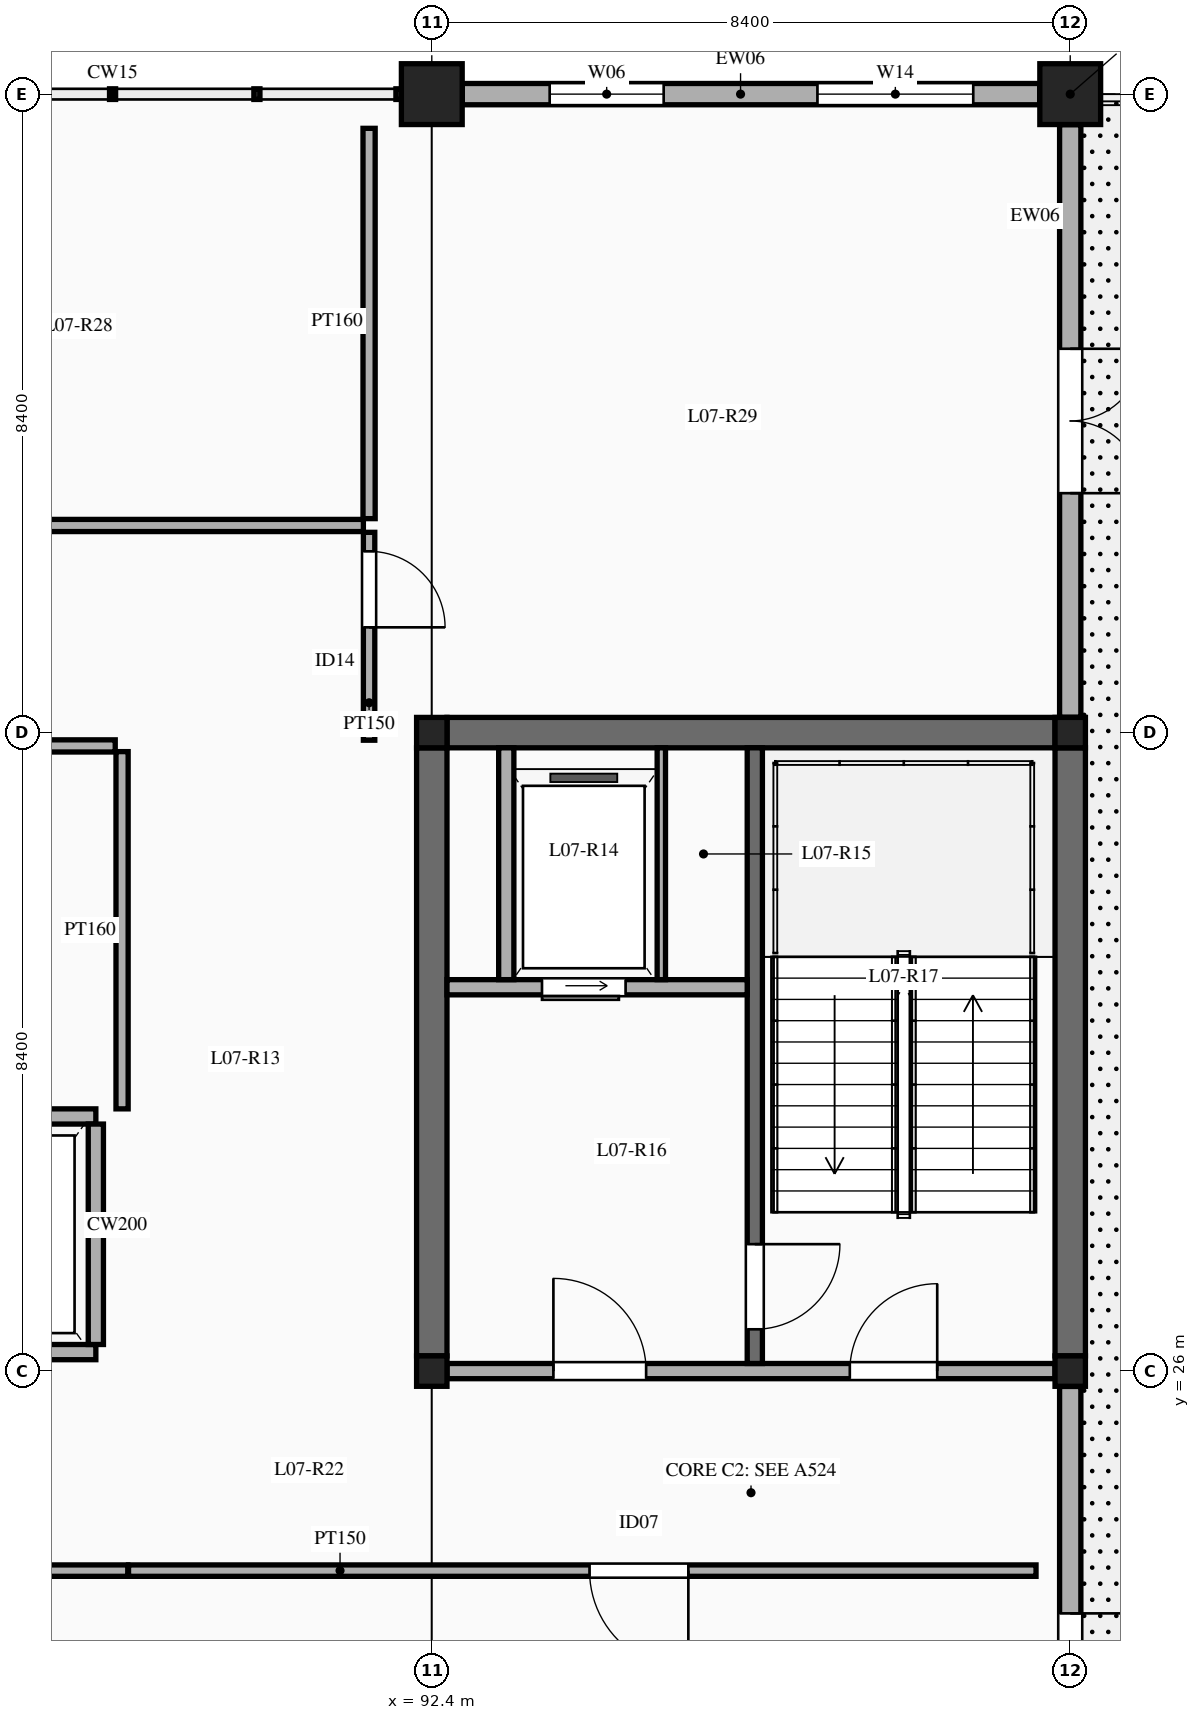
"""IFC4 building model, lengths in metres.
Left out: names, types, materials, properties, quantities, classifications, styles, units other than length and angle.
Written with IfcOpenShell. Run it as: python <this file> out.ifc"""

import sys

from ifc_helpers import new_model, si_unit, direction, frame, frame_2d, origin, origin_2d, place, context, subcontext, project, spatial, rectangle, extrude, element, fill, save


model = new_model("IFC4")
c1 = context("Model", 3, precision=1e-05, world=origin(), true_north=direction((0.0, 1.0)))
c2 = subcontext(c1, "Body", "Model", "MODEL_VIEW")
j1 = project(units=[si_unit("LENGTHUNIT", "METRE"), si_unit("PLANEANGLEUNIT", "RADIAN")], contexts=[c1])
p1 = place(None, origin())
s1 = spatial("IfcSite", under=j1, at=p1, CompositionType="ELEMENT")
p2 = place(p1, origin())
s2 = spatial("IfcBuilding", under=s1, at=p2, CompositionType="ELEMENT")
p3 = place(p2, frame((0.0, 0.0, 33.0)))
s3 = spatial("IfcBuildingStorey", under=s2, at=p3, CompositionType="ELEMENT", Elevation=33.0)
for number, where, z_axis, x_axis in (
    (1, (92.4, 26.0, 0.0), (0.0, 0.0, 1.0), (1.0, 0.0, 0.0)),
    (2, (92.4, 34.4, 0.0), (0.0, 0.0, 1.0), (1.0, 0.0, 0.0)),
):
    element("IfcColumn", number, at=place(p3, frame(where, z_axis=z_axis, x_axis=x_axis)), inside=s3, PredefinedType="COLUMN", context=c2, shape_type="SweptSolid", body=[
        extrude(rectangle(XDim=0.4, YDim=0.4, at=origin_2d()), origin(), (0.0, 0.0, 1.0), 4.5),
    ])
p4 = place(p3, frame((92.4, 42.8, 0.0), z_axis=(0.0, 0.0, 1.0), x_axis=(1.0, 0.0, 0.0)))
e3 = element("IfcColumn", 3, at=p4, inside=s3, PredefinedType="COLUMN", context=c2, shape_type="SweptSolid", body=[
    extrude(rectangle(XDim=0.8, YDim=0.8, at=origin_2d()), origin(), (0.0, 0.0, 1.0), 4.5),
])
for number, where, z_axis, x_axis in (
    (4, (100.8, 26.0, 0.0), (0.0, 0.0, 1.0), (1.0, 0.0, 0.0)),
    (5, (100.8, 34.4, 0.0), (0.0, 0.0, 1.0), (1.0, 0.0, 0.0)),
):
    element("IfcColumn", number, at=place(p3, frame(where, z_axis=z_axis, x_axis=x_axis)), inside=s3, PredefinedType="COLUMN", context=c2, shape_type="SweptSolid", body=[
        extrude(rectangle(XDim=0.4, YDim=0.4, at=origin_2d()), origin(), (0.0, 0.0, 1.0), 4.5),
    ])
p5 = place(p3, frame((100.8, 42.8, 0.0), z_axis=(0.0, 0.0, 1.0), x_axis=(1.0, 0.0, 0.0)))
e6 = element("IfcColumn", 6, at=p5, inside=s3, PredefinedType="COLUMN", context=c2, shape_type="SweptSolid", body=[
    extrude(rectangle(XDim=0.8, YDim=0.8, at=origin_2d()), origin(), (0.0, 0.0, 1.0), 4.5),
])
for number, where, z_axis, x_axis in (
    (7, (92.4, 26.2, 0.0), (0.0, 0.0, 1.0), (0.0, 1.0, 0.0)),
    (8, (100.8, 26.2, 0.0), (0.0, 0.0, 1.0), (0.0, 1.0, 0.0)),
    (9, (92.6, 34.4, 0.0), (0.0, 0.0, 1.0), (1.0, 0.0, 0.0)),
):
    element("IfcWall", number, at=place(p3, frame(where, z_axis=z_axis, x_axis=x_axis)), inside=s3, PredefinedType="SHEAR", context=c2, shape_type="SweptSolid", body=[
        extrude(rectangle(XDim=8.0, YDim=0.4, at=frame_2d((4.0, 0.0))), origin(), (0.0, 0.0, 1.0), 4.5),
    ])
p6 = place(p3, frame((92.802, 42.8, 0.0), z_axis=(0.0, 0.0, 1.0), x_axis=(1.0, 0.0, 0.0)))
e10 = element("IfcWall", 10, at=p6, inside=s3, PredefinedType="ELEMENTEDWALL", context=c2, shape_type="SweptSolid", body=[
    extrude(rectangle(XDim=7.596, YDim=0.28, at=frame_2d((3.798, 0.0))), origin(), (0.0, 0.0, 1.0), 3.55),
])
p7 = place(p6, frame((1.149, 0.0, 0.9)))
e11 = element("IfcOpeningElement", 11, at=p7, cuts=e10, PredefinedType="OPENING", context=c2, shape_type="SweptSolid", body=[
    extrude(rectangle(XDim=1.5, YDim=2.0, at=frame_2d((0.75, 1.0))), frame((0.0, 0.15, 0.0), z_axis=(0.0, -1.0, 0.0), x_axis=(1.0, 0.0, 0.0)), (0.0, 0.0, 1.0), 0.3),
])
p8 = place(p6, frame((4.672, 0.0, 0.9)))
e12 = element("IfcOpeningElement", 12, at=p8, cuts=e10, PredefinedType="OPENING", context=c2, shape_type="SweptSolid", body=[
    extrude(rectangle(XDim=2.05, YDim=2.1, at=frame_2d((1.025, 1.05))), frame((0.0, 0.15, 0.0), z_axis=(0.0, -1.0, 0.0), x_axis=(1.0, 0.0, 0.0)), (0.0, 0.0, 1.0), 0.3),
])
p9 = place(p3, frame((100.8, 18.027, 0.0), z_axis=(0.0, 0.0, 1.0), x_axis=(0.0, 1.0, 0.0)))
e13 = element("IfcWall", 13, at=p9, inside=s3, PredefinedType="ELEMENTEDWALL", context=c2, shape_type="SweptSolid", body=[
    extrude(rectangle(XDim=7.771, YDim=0.28, at=frame_2d((3.885, 0.0))), origin(), (0.0, 0.0, 1.0), 3.55),
])
p10 = place(p9, frame((2.986, 0.0, 0.0)))
e14 = element("IfcOpeningElement", 14, at=p10, cuts=e13, PredefinedType="OPENING", context=c2, shape_type="SweptSolid", body=[
    extrude(rectangle(XDim=1.8, YDim=2.2, at=frame_2d((0.9, 1.1))), frame((0.0, 0.15, 0.0), z_axis=(0.0, -1.0, 0.0), x_axis=(1.0, 0.0, 0.0)), (0.0, 0.0, 1.0), 0.3),
])
p11 = place(p3, frame((100.8, 34.602, 0.0), z_axis=(0.0, 0.0, 1.0), x_axis=(0.0, 1.0, 0.0)))
e15 = element("IfcWall", 15, at=p11, inside=s3, PredefinedType="ELEMENTEDWALL", context=c2, shape_type="SweptSolid", body=[
    extrude(rectangle(XDim=7.796, YDim=0.28, at=frame_2d((3.898, 0.0))), origin(), (0.0, 0.0, 1.0), 3.55),
])
p12 = place(p11, frame((2.948, 0.0, 0.0)))
e16 = element("IfcOpeningElement", 16, at=p12, cuts=e15, PredefinedType="OPENING", context=c2, shape_type="SweptSolid", body=[
    extrude(rectangle(XDim=1.9, YDim=2.2, at=frame_2d((0.95, 1.1))), frame((0.0, 0.15, 0.0), z_axis=(0.0, -1.0, 0.0), x_axis=(1.0, 0.0, 0.0)), (0.0, 0.0, 1.0), 0.3),
])
p13 = place(p3, frame((92.6, 26.0, 0.0), z_axis=(0.0, 0.0, 1.0), x_axis=(1.0, 0.0, 0.0)))
e17 = element("IfcWall", 17, at=p13, inside=s3, PredefinedType="SOLIDWALL", context=c2, shape_type="SweptSolid", body=[
    extrude(rectangle(XDim=8.0, YDim=0.2, at=frame_2d((4.0, 0.0))), origin(), (0.0, 0.0, 1.0), 3.73),
])
p14 = place(p13, frame((1.4, 0.0, 0.0)))
e18 = element("IfcOpeningElement", 18, at=p14, cuts=e17, PredefinedType="OPENING", context=c2, shape_type="SweptSolid", body=[
    extrude(rectangle(XDim=1.22, YDim=2.15, at=frame_2d((0.61, 1.075))), frame((0.0, 0.11, 0.0), z_axis=(0.0, -1.0, 0.0), x_axis=(1.0, 0.0, 0.0)), (0.0, 0.0, 1.0), 0.22),
])
p15 = place(p13, frame((5.3, 0.0, 0.0)))
e19 = element("IfcOpeningElement", 19, at=p15, cuts=e17, PredefinedType="OPENING", context=c2, shape_type="SweptSolid", body=[
    extrude(rectangle(XDim=1.15, YDim=2.15, at=frame_2d((0.575, 1.075))), frame((0.0, 0.11, 0.0), z_axis=(0.0, -1.0, 0.0), x_axis=(1.0, 0.0, 0.0)), (0.0, 0.0, 1.0), 0.22),
])
p16 = place(p3, frame((96.65, 26.1, 0.0), z_axis=(0.0, 0.0, 1.0), x_axis=(0.0, 1.0, 0.0)))
e20 = element("IfcWall", 20, at=p16, inside=s3, PredefinedType="SOLIDWALL", context=c2, shape_type="SweptSolid", body=[
    extrude(rectangle(XDim=8.1, YDim=0.2, at=frame_2d((4.05, 0.0))), origin(), (0.0, 0.0, 1.0), 4.3),
])
p17 = place(p16, frame((0.45, 0.0, 0.0)))
e21 = element("IfcOpeningElement", 21, at=p17, cuts=e20, PredefinedType="OPENING", context=c2, shape_type="SweptSolid", body=[
    extrude(rectangle(XDim=1.12, YDim=2.15, at=frame_2d((0.56, 1.075))), frame((0.0, 0.11, 0.0), z_axis=(0.0, -1.0, 0.0), x_axis=(1.0, 0.0, 0.0)), (0.0, 0.0, 1.0), 0.22),
])
p18 = place(p3, frame((92.6, 31.05, 0.0), z_axis=(0.0, 0.0, 1.0), x_axis=(1.0, 0.0, 0.0)))
e22 = element("IfcWall", 22, at=p18, inside=s3, PredefinedType="SOLIDWALL", context=c2, shape_type="SweptSolid", body=[
    extrude(rectangle(XDim=3.95, YDim=0.2, at=frame_2d((1.975, 0.0))), origin(), (0.0, 0.0, 1.0), 4.3),
])
p19 = place(p18, frame((1.25, 0.0, 0.0)))
e23 = element("IfcOpeningElement", 23, at=p19, cuts=e22, PredefinedType="OPENING", context=c2, shape_type="SweptSolid", body=[
    extrude(rectangle(XDim=1.1, YDim=2.15, at=frame_2d((0.55, 1.075))), frame((0.0, 0.11, 0.0), z_axis=(0.0, -1.0, 0.0), x_axis=(1.0, 0.0, 0.0)), (0.0, 0.0, 1.0), 0.22),
])
p20 = place(p3, frame((95.42, 31.15, 0.0), z_axis=(0.0, 0.0, 1.0), x_axis=(0.0, 1.0, 0.0)))
e24 = element("IfcWall", 24, at=p20, inside=s3, PredefinedType="PARTITIONING", context=c2, shape_type="SweptSolid", body=[
    extrude(rectangle(XDim=3.05, YDim=0.11, at=frame_2d((1.525, 0.0))), origin(), (0.0, 0.0, 1.0), 4.3),
])
p21 = place(p3, frame((93.38, 31.15, 0.0), z_axis=(0.0, 0.0, 1.0), x_axis=(0.0, 1.0, 0.0)))
e25 = element("IfcWall", 25, at=p21, inside=s3, PredefinedType="SOLIDWALL", context=c2, shape_type="SweptSolid", body=[
    extrude(rectangle(XDim=3.05, YDim=0.2, at=frame_2d((1.525, 0.0))), origin(), (0.0, 0.0, 1.0), 4.3),
])
p22 = place(p3, frame((85.62, 26.25, 0.0), z_axis=(0.0, 0.0, 1.0), x_axis=(1.0, 0.0, 0.0)))
e26 = element("IfcWall", 26, at=p22, inside=s3, PredefinedType="SOLIDWALL", context=c2, shape_type="SweptSolid", body=[
    extrude(rectangle(XDim=2.36, YDim=0.2, at=frame_2d((1.18, 0.0))), origin(), (0.0, 0.0, 1.0), 3.73),
])
p23 = place(p22, frame((0.605, 0.0, 0.0)))
e27 = element("IfcOpeningElement", 27, at=p23, cuts=e26, PredefinedType="OPENING", context=c2, shape_type="SweptSolid", body=[
    extrude(rectangle(XDim=1.15, YDim=2.2, at=frame_2d((0.575, 1.1))), frame((0.0, 0.11, 0.0), z_axis=(0.0, -1.0, 0.0), x_axis=(1.0, 0.0, 0.0)), (0.0, 0.0, 1.0), 0.22),
])
p24 = place(p3, frame((85.62, 29.35, 0.0), z_axis=(0.0, 0.0, 1.0), x_axis=(1.0, 0.0, 0.0)))
e28 = element("IfcWall", 28, at=p24, inside=s3, PredefinedType="SOLIDWALL", context=c2, shape_type="SweptSolid", body=[
    extrude(rectangle(XDim=2.36, YDim=0.2, at=frame_2d((1.18, 0.0))), origin(), (0.0, 0.0, 1.0), 4.3),
])
p25 = place(p3, frame((87.98, 26.35, 0.0), z_axis=(0.0, 0.0, 1.0), x_axis=(0.0, 1.0, 0.0)))
e29 = element("IfcWall", 29, at=p25, inside=s3, PredefinedType="SOLIDWALL", context=c2, shape_type="SweptSolid", body=[
    extrude(rectangle(XDim=2.9, YDim=0.2, at=frame_2d((1.45, 0.0))), origin(), (0.0, 0.0, 1.0), 3.98),
])
p26 = place(p3, frame((88.325, 29.45, 0.0), z_axis=(0.0, 0.0, 1.0), x_axis=(0.0, 1.0, 0.0)))
e30 = element("IfcWall", 30, at=p26, inside=s3, PredefinedType="PARTITIONING", context=c2, shape_type="SweptSolid", body=[
    extrude(rectangle(XDim=4.7, YDim=0.16, at=frame_2d((2.35, 0.0))), origin(), (0.0, 0.0, 1.0), 3.45),
])
p27 = place(p3, frame((84.455, 34.225, 0.0), z_axis=(0.0, 0.0, 1.0), x_axis=(1.0, 0.0, 0.0)))
e31 = element("IfcWall", 31, at=p27, inside=s3, PredefinedType="PARTITIONING", context=c2, shape_type="SweptSolid", body=[
    extrude(rectangle(XDim=3.78, YDim=0.16, at=frame_2d((1.89, 0.0))), origin(), (0.0, 0.0, 1.0), 3.45),
])
p28 = place(p3, frame((86.35, 23.375, 0.0), z_axis=(0.0, 0.0, 1.0), x_axis=(1.0, 0.0, 0.0)))
e32 = element("IfcWall", 32, at=p28, inside=s3, PredefinedType="PARTITIONING", context=c2, shape_type="SweptSolid", body=[
    extrude(rectangle(XDim=2.05, YDim=0.15, at=frame_2d((1.025, 0.0))), origin(), (0.0, 0.0, 1.0), 3.45),
])
p29 = place(p3, frame((88.41, 23.375, 0.0), z_axis=(0.0, 0.0, 1.0), x_axis=(1.0, 0.0, 0.0)))
e33 = element("IfcWall", 33, at=p29, inside=s3, PredefinedType="PARTITIONING", context=c2, shape_type="SweptSolid", body=[
    extrude(rectangle(XDim=11.94, YDim=0.15, at=frame_2d((5.97, 0.0))), origin(), (0.0, 0.0, 1.0), 3.45),
])
p30 = place(p29, frame((6.066, 0.0, 0.0)))
e34 = element("IfcOpeningElement", 34, at=p30, cuts=e33, PredefinedType="OPENING", context=c2, shape_type="SweptSolid", body=[
    extrude(rectangle(XDim=1.3, YDim=2.25, at=frame_2d((0.65, 1.125))), frame((0.0, 0.085, 0.0), z_axis=(0.0, -1.0, 0.0), x_axis=(1.0, 0.0, 0.0)), (0.0, 0.0, 1.0), 0.17),
])
p31 = place(p3, frame((67.915, 37.125, 0.0), z_axis=(0.0, 0.0, 1.0), x_axis=(1.0, 0.0, 0.0)))
e35 = element("IfcWall", 35, at=p31, inside=s3, PredefinedType="PARTITIONING", context=c2, shape_type="SweptSolid", body=[
    extrude(rectangle(XDim=23.585, YDim=0.16, at=frame_2d((11.792, 0.0))), origin(), (0.0, 0.0, 1.0), 3.45),
])
p32 = place(p31, frame((11.212, 0.0, 0.0)))
e36 = element("IfcOpeningElement", 36, at=p32, cuts=e35, PredefinedType="OPENING", context=c2, shape_type="SweptSolid", body=[
    extrude(rectangle(XDim=1.16, YDim=2.2, at=frame_2d((0.58, 1.1))), frame((0.0, 0.09, 0.0), z_axis=(0.0, -1.0, 0.0), x_axis=(1.0, 0.0, 0.0)), (0.0, 0.0, 1.0), 0.18),
])
p33 = place(p3, frame((91.575, 34.3, 0.0), z_axis=(0.0, 0.0, 1.0), x_axis=(0.0, 1.0, 0.0)))
e37 = element("IfcWall", 37, at=p33, inside=s3, PredefinedType="PARTITIONING", context=c2, shape_type="SweptSolid", body=[
    extrude(rectangle(XDim=2.735, YDim=0.15, at=frame_2d((1.367, 0.0))), origin(), (0.0, 0.0, 1.0), 3.45),
])
p34 = place(p33, frame((1.485, 0.0, 0.0)))
e38 = element("IfcOpeningElement", 38, at=p34, cuts=e37, PredefinedType="OPENING", context=c2, shape_type="SweptSolid", body=[
    extrude(rectangle(XDim=1.0, YDim=2.15, at=frame_2d((0.5, 1.075))), frame((0.0, 0.085, 0.0), z_axis=(0.0, -1.0, 0.0), x_axis=(1.0, 0.0, 0.0)), (0.0, 0.0, 1.0), 0.17),
])
p35 = place(p3, frame((91.575, 37.215, 0.0), z_axis=(0.0, 0.0, 1.0), x_axis=(0.0, 1.0, 0.0)))
e39 = element("IfcWall", 39, at=p35, inside=s3, PredefinedType="PARTITIONING", context=c2, shape_type="SweptSolid", body=[
    extrude(rectangle(XDim=5.135, YDim=0.16, at=frame_2d((2.567, 0.0))), origin(), (0.0, 0.0, 1.0), 3.45),
])
p36 = place(p7, origin())
e40 = element("IfcWindow", 40, at=p36, inside=s3, PartitioningType="DOUBLE_PANEL_VERTICAL", PredefinedType="WINDOW", context=c2, shape_type="SweptSolid", body=[
    extrude(rectangle(XDim=1.5, YDim=2.0, at=frame_2d((0.75, 1.0))), frame((0.0, 0.03, 0.0), z_axis=(0.0, -1.0, 0.0), x_axis=(1.0, 0.0, 0.0)), (0.0, 0.0, 1.0), 0.06),
])
fill(e11, e40)
p37 = place(p8, origin())
e41 = element("IfcWindow", 41, at=p37, inside=s3, PartitioningType="TRIPLE_PANEL_VERTICAL", PredefinedType="WINDOW", context=c2, shape_type="SweptSolid", body=[
    extrude(rectangle(XDim=2.05, YDim=2.1, at=frame_2d((1.025, 1.05))), frame((0.0, 0.03, 0.0), z_axis=(0.0, -1.0, 0.0), x_axis=(1.0, 0.0, 0.0)), (0.0, 0.0, 1.0), 0.06),
])
fill(e12, e41)
p38 = place(p10, frame((1.8, 0.0, 0.0), z_axis=(0.0, 0.0, 1.0), x_axis=(-1.0, 0.0, 0.0)))
e42 = element("IfcDoor", 42, at=p38, inside=s3, OperationType="DOUBLE_DOOR_SINGLE_SWING", PredefinedType="DOOR", context=c2, shape_type="SweptSolid", body=[
    extrude(rectangle(XDim=1.8, YDim=2.2, at=frame_2d((0.9, 1.1))), frame((0.0, 0.025, 0.0), z_axis=(0.0, -1.0, 0.0), x_axis=(1.0, 0.0, 0.0)), (0.0, 0.0, 1.0), 0.05),
])
fill(e14, e42)
p39 = place(p12, frame((1.9, 0.0, 0.0), z_axis=(0.0, 0.0, 1.0), x_axis=(-1.0, 0.0, 0.0)))
e43 = element("IfcDoor", 43, at=p39, inside=s3, OperationType="DOUBLE_DOOR_SINGLE_SWING", PredefinedType="DOOR", context=c2, shape_type="SweptSolid", body=[
    extrude(rectangle(XDim=1.9, YDim=2.2, at=frame_2d((0.95, 1.1))), frame((0.0, 0.025, 0.0), z_axis=(0.0, -1.0, 0.0), x_axis=(1.0, 0.0, 0.0)), (0.0, 0.0, 1.0), 0.05),
])
fill(e16, e43)
p40 = place(p14, origin())
e44 = element("IfcDoor", 44, at=p40, inside=s3, OperationType="SINGLE_SWING_LEFT", PredefinedType="DOOR", context=c2, shape_type="SweptSolid", body=[
    extrude(rectangle(XDim=1.22, YDim=2.15, at=frame_2d((0.61, 1.075))), frame((0.0, 0.025, 0.0), z_axis=(0.0, -1.0, 0.0), x_axis=(1.0, 0.0, 0.0)), (0.0, 0.0, 1.0), 0.05),
])
fill(e18, e44)
p41 = place(p15, origin())
e45 = element("IfcDoor", 45, at=p41, inside=s3, OperationType="SINGLE_SWING_RIGHT", PredefinedType="DOOR", context=c2, shape_type="SweptSolid", body=[
    extrude(rectangle(XDim=1.15, YDim=2.15, at=frame_2d((0.575, 1.075))), frame((0.0, 0.025, 0.0), z_axis=(0.0, -1.0, 0.0), x_axis=(1.0, 0.0, 0.0)), (0.0, 0.0, 1.0), 0.05),
])
fill(e19, e45)
p42 = place(p17, frame((1.12, 0.0, 0.0), z_axis=(0.0, 0.0, 1.0), x_axis=(-1.0, 0.0, 0.0)))
e46 = element("IfcDoor", 46, at=p42, inside=s3, OperationType="SINGLE_SWING_LEFT", PredefinedType="DOOR", context=c2, shape_type="SweptSolid", body=[
    extrude(rectangle(XDim=1.12, YDim=2.15, at=frame_2d((0.56, 1.075))), frame((0.0, 0.025, 0.0), z_axis=(0.0, -1.0, 0.0), x_axis=(1.0, 0.0, 0.0)), (0.0, 0.0, 1.0), 0.05),
])
fill(e21, e46)
p43 = place(p19, frame((1.1, 0.0, 0.0), z_axis=(0.0, 0.0, 1.0), x_axis=(-1.0, 0.0, 0.0)))
e47 = element("IfcDoor", 47, at=p43, inside=s3, OperationType="SLIDING_TO_LEFT", PredefinedType="DOOR", context=c2, shape_type="SweptSolid", body=[
    extrude(rectangle(XDim=1.1, YDim=2.15, at=frame_2d((0.55, 1.075))), frame((0.0, 0.025, 0.0), z_axis=(0.0, -1.0, 0.0), x_axis=(1.0, 0.0, 0.0)), (0.0, 0.0, 1.0), 0.05),
])
fill(e23, e47)
p44 = place(p30, frame((1.3, 0.0, 0.0), z_axis=(0.0, 0.0, 1.0), x_axis=(-1.0, 0.0, 0.0)))
e48 = element("IfcDoor", 48, at=p44, inside=s3, OperationType="SINGLE_SWING_LEFT", PredefinedType="DOOR", context=c2, shape_type="SweptSolid", body=[
    extrude(rectangle(XDim=1.3, YDim=2.25, at=frame_2d((0.65, 1.125))), frame((0.0, 0.025, 0.0), z_axis=(0.0, -1.0, 0.0), x_axis=(1.0, 0.0, 0.0)), (0.0, 0.0, 1.0), 0.05),
])
fill(e34, e48)
p45 = place(p34, frame((1.0, 0.0, 0.0), z_axis=(0.0, 0.0, 1.0), x_axis=(-1.0, 0.0, 0.0)))
e49 = element("IfcDoor", 49, at=p45, inside=s3, OperationType="SINGLE_SWING_RIGHT", PredefinedType="DOOR", context=c2, shape_type="SweptSolid", body=[
    extrude(rectangle(XDim=1.0, YDim=2.15, at=frame_2d((0.5, 1.075))), frame((0.0, 0.025, 0.0), z_axis=(0.0, -1.0, 0.0), x_axis=(1.0, 0.0, 0.0)), (0.0, 0.0, 1.0), 0.05),
])
fill(e38, e49)
save(model, sys.argv[1])
